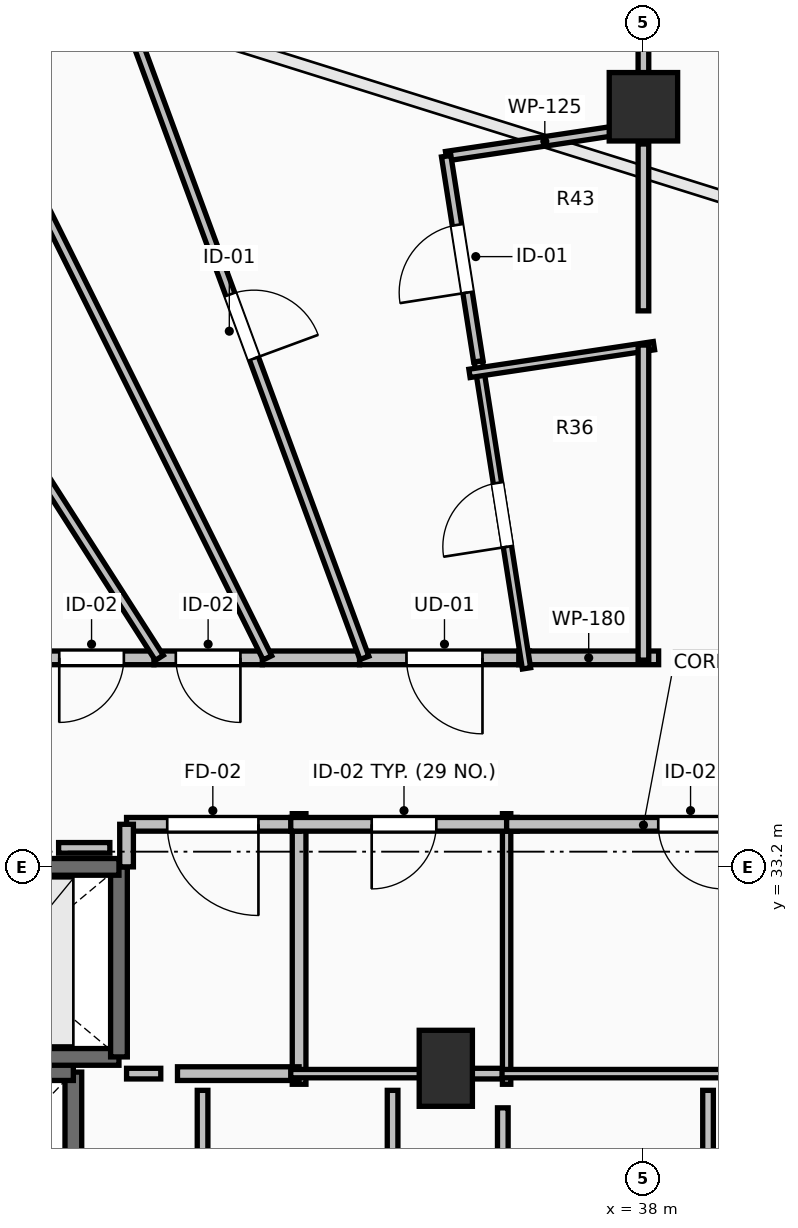
"""IFC4 building model, lengths in metres.
Left out: names, types, materials, properties, quantities, classifications, styles, units other than length and angle.
Written with IfcOpenShell. Run it as: python <this file> out.ifc"""

import sys

from ifc_helpers import new_model, si_unit, direction, frame, frame_2d, origin, origin_2d, place, context, subcontext, project, spatial, rectangle, extrude, element, fill, save


model = new_model("IFC4")
c1 = context("Model", 3, precision=1e-05, world=origin(), true_north=direction((0.0, 1.0)))
c2 = subcontext(c1, "Body", "Model", "MODEL_VIEW")
j1 = project(units=[si_unit("LENGTHUNIT", "METRE"), si_unit("PLANEANGLEUNIT", "RADIAN")], contexts=[c1])
p1 = place(None, origin())
s1 = spatial("IfcSite", under=j1, at=p1, CompositionType="ELEMENT")
p2 = place(p1, origin())
s2 = spatial("IfcBuilding", under=s1, at=p2, CompositionType="ELEMENT")
p3 = place(p2, frame((0.0, 0.0, 203.65)))
s3 = spatial("IfcBuildingStorey", under=s2, at=p3, CompositionType="ELEMENT", Elevation=203.65)
p4 = place(p3, frame((38.0, 43.2, 0.0), z_axis=(0.0, 0.0, 1.0), x_axis=(0.0, 1.0, 0.0)))
e1 = element("IfcColumn", 1, at=p4, inside=s3, PredefinedType="COLUMN", context=c2, shape_type="SweptSolid", body=[
    extrude(rectangle(XDim=0.9, YDim=0.9, at=origin_2d()), origin(), (0.0, 0.0, 1.0), 3.55),
])
p5 = place(p3, frame((35.4, 30.55, 0.0), z_axis=(0.0, 0.0, 1.0), x_axis=(1.0, 0.0, 0.0)))
e2 = element("IfcColumn", 2, at=p5, inside=s3, PredefinedType="PILASTER", context=c2, shape_type="SweptSolid", body=[
    extrude(rectangle(XDim=0.7, YDim=1.0, at=origin_2d()), origin(), (0.0, 0.0, 1.0), 3.55),
])
p6 = place(p3, frame((30.5, 28.0, 0.0), z_axis=(0.0, 0.0, 1.0), x_axis=(0.0, 1.0, 0.0)))
e3 = element("IfcWall", 3, at=p6, inside=s3, PredefinedType="SHEAR", context=c2, shape_type="SweptSolid", body=[
    extrude(rectangle(XDim=2.5, YDim=0.22, at=frame_2d((1.25, 0.0))), origin(), (0.0, 0.0, 1.0), 3.29),
])
p7 = place(p3, frame((30.5, 30.5, 0.0), z_axis=(0.0, 0.0, 1.0), x_axis=(-1.0, 0.0, 0.0)))
e4 = element("IfcWall", 4, at=p7, inside=s3, PredefinedType="SHEAR", context=c2, shape_type="SweptSolid", body=[
    extrude(rectangle(XDim=2.4, YDim=0.22, at=frame_2d((1.2, 0.0))), origin(), (0.0, 0.0, 1.0), 3.29),
])
p8 = place(p3, frame((28.1, 30.7, 0.0), z_axis=(0.0, 0.0, 1.0), x_axis=(1.0, 0.0, 0.0)))
e5 = element("IfcWall", 5, at=p8, inside=s3, PredefinedType="SOLIDWALL", context=c2, shape_type="SweptSolid", body=[
    extrude(rectangle(XDim=3.0, YDim=0.22, at=frame_2d((1.5, 0.0))), origin(), (0.0, 0.0, 1.0), 3.29),
])
p9 = place(p3, frame((31.1, 30.7, 0.0), z_axis=(0.0, 0.0, 1.0), x_axis=(0.0, 1.0, 0.0)))
e6 = element("IfcWall", 6, at=p9, inside=s3, PredefinedType="SOLIDWALL", context=c2, shape_type="SweptSolid", body=[
    extrude(rectangle(XDim=2.5, YDim=0.22, at=frame_2d((1.25, 0.0))), origin(), (0.0, 0.0, 1.0), 3.29),
])
p10 = place(p3, frame((31.1, 33.2, 0.0), z_axis=(0.0, 0.0, 1.0), x_axis=(-1.0, 0.0, 0.0)))
e7 = element("IfcWall", 7, at=p10, inside=s3, PredefinedType="SOLIDWALL", context=c2, shape_type="SweptSolid", body=[
    extrude(rectangle(XDim=3.0, YDim=0.22, at=frame_2d((1.5, 0.0))), origin(), (0.0, 0.0, 1.0), 3.29),
])
p11 = place(p10, frame((0.9, 0.0, 0.0)))
e8 = element("IfcOpeningElement", 8, at=p11, cuts=e7, PredefinedType="OPENING", context=c2, shape_type="SweptSolid", body=[
    extrude(rectangle(XDim=1.2, YDim=2.2, at=frame_2d((0.6, 1.1))), frame((0.0, 0.125, 0.0), z_axis=(0.0, -1.0, 0.0), x_axis=(1.0, 0.0, 0.0)), (0.0, 0.0, 1.0), 0.25),
])
p12 = place(p3, frame((33.47, 30.34, 0.0), z_axis=(0.0, 0.0, 1.0), x_axis=(0.0, 1.0, 0.0)))
e9 = element("IfcWall", 9, at=p12, inside=s3, PredefinedType="PARTITIONING", context=c2, shape_type="SweptSolid", body=[
    extrude(rectangle(XDim=3.56, YDim=0.18, at=frame_2d((1.78, 0.0))), origin(), (0.0, 0.0, 1.0), 3.29),
])
p13 = place(p3, frame((31.87, 30.48, 0.0), z_axis=(0.0, 0.0, 1.0), x_axis=(1.0, 0.0, 0.0)))
e10 = element("IfcWall", 10, at=p13, inside=s3, PredefinedType="PARTITIONING", context=c2, shape_type="SweptSolid", body=[
    extrude(rectangle(XDim=1.6, YDim=0.18, at=frame_2d((0.8, 0.0))), origin(), (0.0, 0.0, 1.0), 3.29),
])
p14 = place(p3, frame((33.47, 33.76, 0.0), z_axis=(0.0, 0.0, 1.0), x_axis=(-1.0, 0.0, 0.0)))
e11 = element("IfcWall", 11, at=p14, inside=s3, PredefinedType="PARTITIONING", context=c2, shape_type="SweptSolid", body=[
    extrude(rectangle(XDim=2.27, YDim=0.18, at=frame_2d((1.135, 0.0))), origin(), (0.0, 0.0, 1.0), 3.29),
])
p15 = place(p14, frame((0.535, 0.0, 0.0)))
e12 = element("IfcOpeningElement", 12, at=p15, cuts=e11, PredefinedType="OPENING", context=c2, shape_type="SweptSolid", body=[
    extrude(rectangle(XDim=1.2, YDim=2.15, at=frame_2d((0.6, 1.075))), frame((0.0, 0.105, 0.0), z_axis=(0.0, -1.0, 0.0), x_axis=(1.0, 0.0, 0.0)), (0.0, 0.0, 1.0), 0.21),
])
p16 = place(p3, frame((31.2, 33.76, 0.0), z_axis=(0.0, 0.0, 1.0), x_axis=(0.0, -1.0, 0.0)))
e13 = element("IfcWall", 13, at=p16, inside=s3, PredefinedType="PARTITIONING", context=c2, shape_type="SweptSolid", body=[
    extrude(rectangle(XDim=0.56, YDim=0.18, at=frame_2d((0.28, 0.0))), origin(), (0.0, 0.0, 1.0), 3.29),
])
p17 = place(p3, frame((36.2, 30.34, 0.0), z_axis=(0.0, 0.0, 1.0), x_axis=(0.0, 1.0, 0.0)))
e14 = element("IfcWall", 14, at=p17, inside=s3, PredefinedType="PARTITIONING", context=c2, shape_type="SweptSolid", body=[
    extrude(rectangle(XDim=3.56, YDim=0.11, at=frame_2d((1.78, 0.0))), origin(), (0.0, 0.0, 1.0), 2.482),
])
p18 = place(p3, frame((33.36, 30.48, 0.0), z_axis=(0.0, 0.0, 1.0), x_axis=(1.0, 0.0, 0.0)))
e15 = element("IfcWall", 15, at=p18, inside=s3, PredefinedType="PARTITIONING", context=c2, shape_type="SweptSolid", body=[
    extrude(rectangle(XDim=1.81, YDim=0.11, at=frame_2d((0.905, 0.0))), origin(), (0.0, 0.0, 1.0), 3.29),
])
p19 = place(p3, frame((36.34, 33.76, 0.0), z_axis=(0.0, 0.0, 1.0), x_axis=(-1.0, 0.0, 0.0)))
e16 = element("IfcWall", 16, at=p19, inside=s3, PredefinedType="PARTITIONING", context=c2, shape_type="SweptSolid", body=[
    extrude(rectangle(XDim=2.98, YDim=0.18, at=frame_2d((1.49, 0.0))), origin(), (0.0, 0.0, 1.0), 3.29),
])
p20 = place(p19, frame((1.065, 0.0, 0.0)))
e17 = element("IfcOpeningElement", 17, at=p20, cuts=e16, PredefinedType="OPENING", context=c2, shape_type="SweptSolid", body=[
    extrude(rectangle(XDim=0.85, YDim=2.1, at=frame_2d((0.425, 1.05))), frame((0.0, 0.105, 0.0), z_axis=(0.0, -1.0, 0.0), x_axis=(1.0, 0.0, 0.0)), (0.0, 0.0, 1.0), 0.21),
])
p21 = place(p3, frame((36.11, 30.48, 0.0), z_axis=(0.0, 0.0, 1.0), x_axis=(1.0, 0.0, 0.0)))
e18 = element("IfcWall", 18, at=p21, inside=s3, PredefinedType="PARTITIONING", context=c2, shape_type="SweptSolid", body=[
    extrude(rectangle(XDim=3.21, YDim=0.11, at=frame_2d((1.605, 0.0))), origin(), (0.0, 0.0, 1.0), 2.482),
])
p22 = place(p3, frame((41.04, 33.76, 0.0), z_axis=(0.0, 0.0, 1.0), x_axis=(-1.0, 0.0, 0.0)))
e19 = element("IfcWall", 19, at=p22, inside=s3, PredefinedType="PARTITIONING", context=c2, shape_type="SweptSolid", body=[
    extrude(rectangle(XDim=4.84, YDim=0.18, at=frame_2d((2.42, 0.0))), origin(), (0.0, 0.0, 1.0), 3.29),
])
p23 = place(p22, frame((1.995, 0.0, 0.0)))
e20 = element("IfcOpeningElement", 20, at=p23, cuts=e19, PredefinedType="OPENING", context=c2, shape_type="SweptSolid", body=[
    extrude(rectangle(XDim=0.85, YDim=2.1, at=frame_2d((0.425, 1.05))), frame((0.0, 0.105, 0.0), z_axis=(0.0, -1.0, 0.0), x_axis=(1.0, 0.0, 0.0)), (0.0, 0.0, 1.0), 0.21),
])
p24 = place(p3, frame((36.5, 35.95, 0.0), z_axis=(0.0, 0.0, 1.0), x_axis=(-1.0, 0.0, 0.0)))
e21 = element("IfcWall", 21, at=p24, inside=s3, PredefinedType="PARTITIONING", context=c2, shape_type="SweptSolid", body=[
    extrude(rectangle(XDim=2.235, YDim=0.18, at=frame_2d((1.118, 0.0))), origin(), (0.0, 0.0, 1.0), 3.29),
])
p25 = place(p24, frame((0.617, 0.0, 0.0)))
e22 = element("IfcOpeningElement", 22, at=p25, cuts=e21, PredefinedType="OPENING", context=c2, shape_type="SweptSolid", body=[
    extrude(rectangle(XDim=1.0, YDim=2.15, at=frame_2d((0.5, 1.075))), frame((0.0, 0.105, 0.0), z_axis=(0.0, -1.0, 0.0), x_axis=(1.0, 0.0, 0.0)), (0.0, 0.0, 1.0), 0.21),
])
p26 = place(p3, frame((38.2, 35.95, 0.0), z_axis=(0.0, 0.0, 1.0), x_axis=(-1.0, 0.0, 0.0)))
e23 = element("IfcWall", 23, at=p26, inside=s3, PredefinedType="PARTITIONING", context=c2, shape_type="SweptSolid", body=[
    extrude(rectangle(XDim=1.84, YDim=0.18, at=frame_2d((0.92, 0.0))), origin(), (0.0, 0.0, 1.0), 3.29),
])
p27 = place(p3, frame((34.265, 35.95, 0.0), z_axis=(0.0, 0.0, 1.0), x_axis=(-1.0, 0.0, 0.0)))
e24 = element("IfcWall", 24, at=p27, inside=s3, PredefinedType="PARTITIONING", context=c2, shape_type="SweptSolid", body=[
    extrude(rectangle(XDim=1.279, YDim=0.18, at=frame_2d((0.639, 0.0))), origin(), (0.0, 0.0, 1.0), 3.29),
])
p28 = place(p3, frame((32.986, 35.95, 0.0), z_axis=(0.0, 0.0, 1.0), x_axis=(-1.0, 0.0, 0.0)))
e25 = element("IfcWall", 25, at=p28, inside=s3, PredefinedType="PARTITIONING", context=c2, shape_type="SweptSolid", body=[
    extrude(rectangle(XDim=1.426, YDim=0.18, at=frame_2d((0.713, 0.0))), origin(), (0.0, 0.0, 1.0), 3.29),
])
p29 = place(p28, frame((0.288, 0.0, 0.0)))
e26 = element("IfcOpeningElement", 26, at=p29, cuts=e25, PredefinedType="OPENING", context=c2, shape_type="SweptSolid", body=[
    extrude(rectangle(XDim=0.85, YDim=2.1, at=frame_2d((0.425, 1.05))), frame((0.0, 0.105, 0.0), z_axis=(0.0, -1.0, 0.0), x_axis=(1.0, 0.0, 0.0)), (0.0, 0.0, 1.0), 0.21),
])
p30 = place(p3, frame((31.56, 35.95, 0.0), z_axis=(0.0, 0.0, 1.0), x_axis=(-1.0, 0.0, 0.0)))
e27 = element("IfcWall", 27, at=p30, inside=s3, PredefinedType="PARTITIONING", context=c2, shape_type="SweptSolid", body=[
    extrude(rectangle(XDim=1.641, YDim=0.18, at=frame_2d((0.821, 0.0))), origin(), (0.0, 0.0, 1.0), 2.482),
])
p31 = place(p30, frame((0.396, 0.0, 0.0)))
e28 = element("IfcOpeningElement", 28, at=p31, cuts=e27, PredefinedType="OPENING", context=c2, shape_type="SweptSolid", body=[
    extrude(rectangle(XDim=0.85, YDim=2.1, at=frame_2d((0.425, 1.05))), frame((0.0, 0.105, 0.0), z_axis=(0.0, -1.0, 0.0), x_axis=(1.0, 0.0, 0.0)), (0.0, 0.0, 1.0), 0.21),
])
p32 = place(p3, frame((36.462, 35.812, 0.0), z_axis=(0.0, 0.0, 1.0), x_axis=(-0.154883213323, 0.987932786292, 0.0)))
e29 = element("IfcWall", 29, at=p32, inside=s3, PredefinedType="PARTITIONING", context=c2, shape_type="SweptSolid", body=[
    extrude(rectangle(XDim=4.089, YDim=0.11, at=frame_2d((2.044, 0.0))), origin(), (0.0, 0.0, 1.0), 2.936),
])
p33 = place(p32, frame((1.619, 0.0, 0.0)))
e30 = element("IfcOpeningElement", 30, at=p33, cuts=e29, PredefinedType="OPENING", context=c2, shape_type="SweptSolid", body=[
    extrude(rectangle(XDim=0.85, YDim=2.1, at=frame_2d((0.425, 1.05))), frame((0.0, 0.07, 0.0), z_axis=(0.0, -1.0, 0.0), x_axis=(1.0, 0.0, 0.0)), (0.0, 0.0, 1.0), 0.14),
])
p34 = place(p3, frame((35.405, 42.55, 0.0), z_axis=(0.0, 0.0, 1.0), x_axis=(0.988900154693, 0.148581573718, 0.0)))
e31 = element("IfcWall", 31, at=p34, inside=s3, PredefinedType="PARTITIONING", context=c2, shape_type="SweptSolid", body=[
    extrude(rectangle(XDim=2.624, YDim=0.125, at=frame_2d((1.312, 0.0))), origin(), (0.0, 0.0, 1.0), 2.482),
])
p35 = place(p3, frame((35.828, 39.851, 0.0), z_axis=(0.0, 0.0, 1.0), x_axis=(-0.154971189464, 0.987918989814, 0.0)))
e32 = element("IfcWall", 32, at=p35, inside=s3, PredefinedType="PARTITIONING", context=c2, shape_type="SweptSolid", body=[
    extrude(rectangle(XDim=2.732, YDim=0.125, at=frame_2d((1.366, 0.0))), origin(), (0.0, 0.0, 1.0), 2.482),
])
p36 = place(p35, frame((0.916, 0.0, 0.0)))
e33 = element("IfcOpeningElement", 33, at=p36, cuts=e32, PredefinedType="OPENING", context=c2, shape_type="SweptSolid", body=[
    extrude(rectangle(XDim=0.9, YDim=2.1, at=frame_2d((0.45, 1.05))), frame((0.0, 0.077, 0.0), z_axis=(0.0, -1.0, 0.0), x_axis=(1.0, 0.0, 0.0)), (0.0, 0.0, 1.0), 0.155),
])
p37 = place(p3, frame((31.112, 44.67, 0.0), z_axis=(0.0, 0.0, 1.0), x_axis=(0.346109472243, -0.938194134081, 0.0)))
e34 = element("IfcWall", 34, at=p37, inside=s3, PredefinedType="PARTITIONING", context=c2, shape_type="SweptSolid", body=[
    extrude(rectangle(XDim=9.294, YDim=0.125, at=frame_2d((4.647, 0.0))), origin(), (0.0, 0.0, 1.0), 2.482),
])
p38 = place(p37, frame((4.197, 0.0, 0.0)))
e35 = element("IfcOpeningElement", 35, at=p38, cuts=e34, PredefinedType="OPENING", context=c2, shape_type="SweptSolid", body=[
    extrude(rectangle(XDim=0.9, YDim=2.1, at=frame_2d((0.45, 1.05))), frame((0.0, 0.077, 0.0), z_axis=(0.0, -1.0, 0.0), x_axis=(1.0, 0.0, 0.0)), (0.0, 0.0, 1.0), 0.155),
])
p39 = place(p3, frame((38.138, 40.057, 0.0), z_axis=(0.0, 0.0, 1.0), x_axis=(-0.988892526147, -0.148632337431, 0.0)))
e36 = element("IfcWall", 36, at=p39, inside=s3, PredefinedType="PARTITIONING", context=c2, shape_type="SweptSolid", body=[
    extrude(rectangle(XDim=2.454, YDim=0.11, at=frame_2d((1.227, 0.0))), origin(), (0.0, 0.0, 1.0), 3.022),
])
p40 = place(p3, frame((28.091, 45.928, 0.0), z_axis=(0.0, 0.0, 1.0), x_axis=(0.445267068418, -0.895397809793, 0.0)))
e37 = element("IfcWall", 37, at=p40, inside=s3, PredefinedType="PARTITIONING", context=c2, shape_type="SweptSolid", body=[
    extrude(rectangle(XDim=11.144, YDim=0.125, at=frame_2d((5.572, 0.0))), origin(), (0.0, 0.0, 1.0), 2.482),
])
p41 = place(p3, frame((25.749, 45.138, 0.0), z_axis=(0.0, 0.0, 1.0), x_axis=(0.539168632786, -0.842197830335, 0.0)))
e38 = element("IfcWall", 38, at=p41, inside=s3, PredefinedType="PARTITIONING", context=c2, shape_type="SweptSolid", body=[
    extrude(rectangle(XDim=10.909, YDim=0.125, at=frame_2d((5.455, 0.0))), origin(), (0.0, 0.0, 1.0), 2.482),
])
p42 = place(p3, frame((31.2, 30.48, 0.0), z_axis=(0.0, 0.0, 1.0), x_axis=(1.0, 0.0, 0.0)))
e39 = element("IfcWall", 39, at=p42, inside=s3, PredefinedType="PARTITIONING", context=c2, shape_type="SweptSolid", body=[
    extrude(rectangle(XDim=0.45, YDim=0.14, at=frame_2d((0.225, 0.0))), origin(), (0.0, 0.0, 1.0), 3.29),
])
p43 = place(p3, frame((35.14, 30.48, 0.0), z_axis=(0.0, 0.0, 1.0), x_axis=(1.0, 0.0, 0.0)))
e40 = element("IfcWall", 40, at=p43, inside=s3, PredefinedType="PARTITIONING", context=c2, shape_type="SweptSolid", body=[
    extrude(rectangle(XDim=1.0, YDim=0.14, at=frame_2d((0.5, 0.0))), origin(), (0.0, 0.0, 1.0), 2.482),
])
for number, where, z_axis, x_axis in (
    (41, (32.2, 30.26, 0.0), (0.0, 0.0, 1.0), (0.0, -1.0, 0.0)),
    (42, (34.7, 27.87, 0.0), (0.0, 0.0, 1.0), (0.0, 1.0, 0.0)),
):
    element("IfcWall", number, at=place(p3, frame(where, z_axis=z_axis, x_axis=x_axis)), inside=s3, PredefinedType="PARTITIONING", context=c2, shape_type="SweptSolid", body=[
        extrude(rectangle(XDim=2.39, YDim=0.14, at=frame_2d((1.195, 0.0))), origin(), (0.0, 0.0, 1.0), 3.29),
    ])
p44 = place(p3, frame((36.15, 30.03, 0.0), z_axis=(0.0, 0.0, 1.0), x_axis=(0.0, -1.0, 0.0)))
e43 = element("IfcWall", 43, at=p44, inside=s3, PredefinedType="PARTITIONING", context=c2, shape_type="SweptSolid", body=[
    extrude(rectangle(XDim=2.16, YDim=0.14, at=frame_2d((1.08, 0.0))), origin(), (0.0, 0.0, 1.0), 3.29),
])
p45 = place(p3, frame((38.85, 27.87, 0.0), z_axis=(0.0, 0.0, 1.0), x_axis=(0.0, 1.0, 0.0)))
e44 = element("IfcWall", 44, at=p45, inside=s3, PredefinedType="PARTITIONING", context=c2, shape_type="SweptSolid", body=[
    extrude(rectangle(XDim=2.39, YDim=0.14, at=frame_2d((1.195, 0.0))), origin(), (0.0, 0.0, 1.0), 3.29),
])
p46 = place(p3, frame((47.67, 35.95, 0.0), z_axis=(0.0, 0.0, 1.0), x_axis=(-1.0, 0.0, 0.0)))
e45 = element("IfcWall", 45, at=p46, inside=s3, PredefinedType="PARTITIONING", context=c2, shape_type="SweptSolid", body=[
    extrude(rectangle(XDim=9.25, YDim=0.14, at=frame_2d((4.625, 0.0))), origin(), (0.0, 0.0, 1.0), 2.936),
])
p47 = place(p3, frame((30.98, 33.45, 0.0), z_axis=(0.0, 0.0, 1.0), x_axis=(-1.0, 0.0, 0.0)))
e46 = element("IfcWall", 46, at=p47, inside=s3, PredefinedType="PARTITIONING", context=c2, shape_type="SweptSolid", body=[
    extrude(rectangle(XDim=0.674, YDim=0.14, at=frame_2d((0.337, 0.0))), origin(), (0.0, 0.0, 1.0), 3.29),
])
p48 = place(p3, frame((38.0, 43.16, 0.0), z_axis=(0.0, 0.0, 1.0), x_axis=(0.0, 1.0, 0.0)))
e47 = element("IfcWall", 47, at=p48, inside=s3, PredefinedType="PARTITIONING", context=c2, shape_type="SweptSolid", body=[
    extrude(rectangle(XDim=4.19, YDim=0.14, at=frame_2d((2.095, 0.0))), origin(), (0.0, 0.0, 1.0), 3.29),
])
p49 = place(p3, frame((38.0, 35.92, 0.0), z_axis=(0.0, 0.0, 1.0), x_axis=(0.0, 1.0, 0.0)))
e48 = element("IfcWall", 48, at=p49, inside=s3, PredefinedType="PARTITIONING", context=c2, shape_type="SweptSolid", body=[
    extrude(rectangle(XDim=4.145, YDim=0.14, at=frame_2d((2.073, 0.0))), origin(), (0.0, 0.0, 1.0), 2.936),
])
p50 = place(p3, frame((38.0, 40.515, 0.0), z_axis=(0.0, 0.0, 1.0), x_axis=(0.0, 1.0, 0.0)))
e49 = element("IfcWall", 49, at=p50, inside=s3, PredefinedType="PARTITIONING", context=c2, shape_type="SweptSolid", body=[
    extrude(rectangle(XDim=2.195, YDim=0.14, at=frame_2d((1.098, 0.0))), origin(), (0.0, 0.0, 1.0), 3.29),
])
p51 = place(p15, origin())
e50 = element("IfcDoor", 50, at=p51, inside=s3, OperationType="SINGLE_SWING_LEFT", PredefinedType="DOOR", context=c2, shape_type="SweptSolid", body=[
    extrude(rectangle(XDim=1.2, YDim=2.15, at=frame_2d((0.6, 1.075))), frame((0.0, 0.025, 0.0), z_axis=(0.0, -1.0, 0.0), x_axis=(1.0, 0.0, 0.0)), (0.0, 0.0, 1.0), 0.05),
])
fill(e12, e50)
p52 = place(p20, origin())
e51 = element("IfcDoor", 51, at=p52, inside=s3, OperationType="SINGLE_SWING_RIGHT", PredefinedType="DOOR", context=c2, shape_type="SweptSolid", body=[
    extrude(rectangle(XDim=0.85, YDim=2.1, at=frame_2d((0.425, 1.05))), frame((0.0, 0.025, 0.0), z_axis=(0.0, -1.0, 0.0), x_axis=(1.0, 0.0, 0.0)), (0.0, 0.0, 1.0), 0.05),
])
fill(e17, e51)
p53 = place(p23, origin())
e52 = element("IfcDoor", 52, at=p53, inside=s3, OperationType="SINGLE_SWING_LEFT", PredefinedType="DOOR", context=c2, shape_type="SweptSolid", body=[
    extrude(rectangle(XDim=0.85, YDim=2.1, at=frame_2d((0.425, 1.05))), frame((0.0, 0.025, 0.0), z_axis=(0.0, -1.0, 0.0), x_axis=(1.0, 0.0, 0.0)), (0.0, 0.0, 1.0), 0.05),
])
fill(e20, e52)
p54 = place(p25, origin())
e53 = element("IfcDoor", 53, at=p54, inside=s3, OperationType="SINGLE_SWING_LEFT", PredefinedType="DOOR", context=c2, shape_type="SweptSolid", body=[
    extrude(rectangle(XDim=1.0, YDim=2.15, at=frame_2d((0.5, 1.075))), frame((0.0, 0.025, 0.0), z_axis=(0.0, -1.0, 0.0), x_axis=(1.0, 0.0, 0.0)), (0.0, 0.0, 1.0), 0.05),
])
fill(e22, e53)
p55 = place(p33, origin())
e54 = element("IfcDoor", 54, at=p55, inside=s3, OperationType="SINGLE_SWING_LEFT", PredefinedType="DOOR", context=c2, shape_type="SweptSolid", body=[
    extrude(rectangle(XDim=0.85, YDim=2.1, at=frame_2d((0.425, 1.05))), frame((0.0, 0.025, 0.0), z_axis=(0.0, -1.0, 0.0), x_axis=(1.0, 0.0, 0.0)), (0.0, 0.0, 1.0), 0.05),
])
fill(e30, e54)
p56 = place(p36, origin())
e55 = element("IfcDoor", 55, at=p56, inside=s3, OperationType="SINGLE_SWING_LEFT", PredefinedType="DOOR", context=c2, shape_type="SweptSolid", body=[
    extrude(rectangle(XDim=0.9, YDim=2.1, at=frame_2d((0.45, 1.05))), frame((0.0, 0.025, 0.0), z_axis=(0.0, -1.0, 0.0), x_axis=(1.0, 0.0, 0.0)), (0.0, 0.0, 1.0), 0.05),
])
fill(e33, e55)
p57 = place(p38, origin())
e56 = element("IfcDoor", 56, at=p57, inside=s3, OperationType="SINGLE_SWING_RIGHT", PredefinedType="DOOR", context=c2, shape_type="SweptSolid", body=[
    extrude(rectangle(XDim=0.9, YDim=2.1, at=frame_2d((0.45, 1.05))), frame((0.0, 0.025, 0.0), z_axis=(0.0, -1.0, 0.0), x_axis=(1.0, 0.0, 0.0)), (0.0, 0.0, 1.0), 0.05),
])
fill(e35, e56)
p58 = place(p29, origin())
e57 = element("IfcDoor", 57, at=p58, inside=s3, OperationType="SINGLE_SWING_LEFT", PredefinedType="DOOR", context=c2, shape_type="SweptSolid", body=[
    extrude(rectangle(XDim=0.85, YDim=2.1, at=frame_2d((0.425, 1.05))), frame((0.0, 0.025, 0.0), z_axis=(0.0, -1.0, 0.0), x_axis=(1.0, 0.0, 0.0)), (0.0, 0.0, 1.0), 0.05),
])
fill(e26, e57)
p59 = place(p31, origin())
e58 = element("IfcDoor", 58, at=p59, inside=s3, OperationType="SINGLE_SWING_RIGHT", PredefinedType="DOOR", context=c2, shape_type="SweptSolid", body=[
    extrude(rectangle(XDim=0.85, YDim=2.1, at=frame_2d((0.425, 1.05))), frame((0.0, 0.025, 0.0), z_axis=(0.0, -1.0, 0.0), x_axis=(1.0, 0.0, 0.0)), (0.0, 0.0, 1.0), 0.05),
])
fill(e28, e58)
save(model, sys.argv[1])
